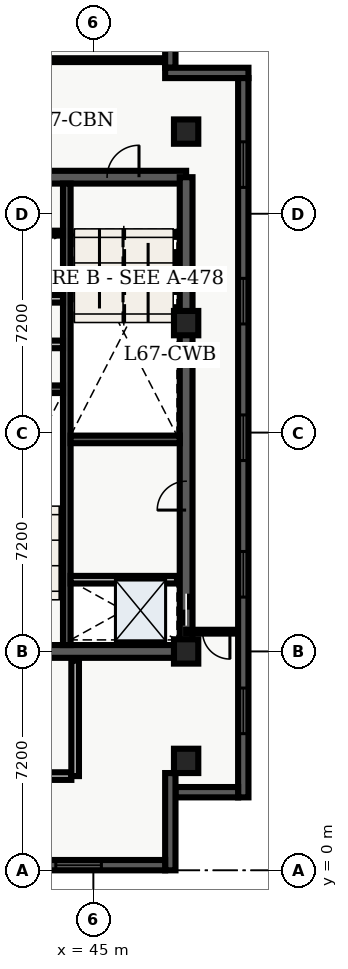
"""IFC4 building model, lengths in metres.
Left out: names, types, materials, properties, quantities, classifications, styles, units other than length and angle.
Written with IfcOpenShell. Run it as: python <this file> out.ifc"""

import sys

from ifc_helpers import new_model, entity, si_unit, converted_unit, direction, frame, origin_with_axes, origin_2d_with_axis, place, context, subcontext, project, spatial, polyline, rectangle, outline, extrude, element, fill, save


model = new_model("IFC4")
c1 = context("Model", 3, precision=1e-05, world=origin_with_axes(), true_north=direction((0.0, 1.0)))
c2 = subcontext(c1, "Body", "Model", "MODEL_VIEW")
j1 = project(units=[si_unit("LENGTHUNIT", "METRE"), converted_unit("PLANEANGLEUNIT", "DEGREE", entity("IfcPlaneAngleMeasure", 0.017), si_unit("PLANEANGLEUNIT", "RADIAN"), dimensions=[0, 0, 0, 0, 0, 0, 0])], contexts=[c1])
p1 = place(None, origin_with_axes())
s1 = spatial("IfcSite", under=j1, at=p1, CompositionType="ELEMENT")
p2 = place(p1, origin_with_axes())
s2 = spatial("IfcBuilding", under=s1, at=p2, CompositionType="ELEMENT")
p3 = place(p2, frame((0.0, 0.0, 272.4), z_axis=(0.0, 0.0, 1.0), x_axis=(1.0, 0.0, 0.0)))
s3 = spatial("IfcBuildingStorey", under=s2, at=p3, CompositionType="ELEMENT", Elevation=272.4)
p4 = place(p3, frame((40.2, 7.2, 0.0), z_axis=(0.0, 0.0, 1.0), x_axis=(1.0, 0.0, 0.0)))
e1 = element("IfcWall", 1, at=p4, inside=s3, PredefinedType="SHEAR", context=c2, shape_type="SweptSolid", body=[
    extrude(outline(polyline([(0.0, -0.21), (7.85, -0.21), (7.85, 0.21), (0.0, 0.21), (0.0, -0.21)])), origin_with_axes(), (0.0, 0.0, 1.0), 3.66),
])
p5 = place(p4, frame((2.175, 0.0, 0.0), z_axis=(0.0, 0.0, 1.0), x_axis=(1.0, 0.0, 0.0)))
e2 = element("IfcOpeningElement", 2, at=p5, cuts=e1, PredefinedType="OPENING", context=c2, shape_type="SweptSolid", body=[
    extrude(rectangle(XDim=1.05, YDim=0.44, at=origin_2d_with_axis()), origin_with_axes(), (0.0, 0.0, 1.0), 2.15),
])
p6 = place(p3, frame((40.2, 22.8, 0.0), z_axis=(0.0, 0.0, 1.0), x_axis=(1.0, 0.0, 0.0)))
e3 = element("IfcWall", 3, at=p6, inside=s3, PredefinedType="SHEAR", context=c2, shape_type="SweptSolid", body=[
    extrude(outline(polyline([(0.0, -0.21), (7.85, -0.21), (7.85, 0.21), (0.0, 0.21), (0.0, -0.21)])), origin_with_axes(), (0.0, 0.0, 1.0), 3.66),
])
p7 = place(p6, frame((5.775, 0.0, 0.0), z_axis=(0.0, 0.0, 1.0), x_axis=(1.0, 0.0, 0.0)))
e4 = element("IfcOpeningElement", 4, at=p7, cuts=e3, PredefinedType="OPENING", context=c2, shape_type="SweptSolid", body=[
    extrude(rectangle(XDim=1.05, YDim=0.44, at=origin_2d_with_axis()), origin_with_axes(), (0.0, 0.0, 1.0), 2.15),
])
p8 = place(p6, frame((2.15, 0.0, 0.0), z_axis=(0.0, 0.0, 1.0), x_axis=(1.0, 0.0, 0.0)))
e5 = element("IfcOpeningElement", 5, at=p8, cuts=e3, PredefinedType="OPENING", context=c2, shape_type="SweptSolid", body=[
    extrude(rectangle(XDim=0.9, YDim=0.44, at=origin_2d_with_axis()), origin_with_axes(), (0.0, 0.0, 1.0), 2.15),
])
p9 = place(p3, frame((48.05, 7.2, 0.0), z_axis=(0.0, 0.0, 1.0), x_axis=(0.0, 1.0, 0.0)))
e6 = element("IfcWall", 6, at=p9, inside=s3, PredefinedType="SHEAR", context=c2, shape_type="SweptSolid", body=[
    extrude(outline(polyline([(0.0, -0.21), (15.6, -0.21), (15.6, 0.21), (0.0, 0.21), (0.0, -0.21)])), origin_with_axes(), (0.0, 0.0, 1.0), 3.66),
])
p10 = place(p9, frame((1.375, 0.0, 0.0), z_axis=(0.0, 0.0, 1.0), x_axis=(1.0, 0.0, 0.0)))
e7 = element("IfcOpeningElement", 7, at=p10, cuts=e6, PredefinedType="OPENING", context=c2, shape_type="SweptSolid", body=[
    extrude(rectangle(XDim=1.05, YDim=0.44, at=origin_2d_with_axis()), origin_with_axes(), (0.0, 0.0, 1.0), 2.15),
])
p11 = place(p9, frame((5.125, 0.0, 0.0), z_axis=(0.0, 0.0, 1.0), x_axis=(1.0, 0.0, 0.0)))
e8 = element("IfcOpeningElement", 8, at=p11, cuts=e6, PredefinedType="OPENING", context=c2, shape_type="SweptSolid", body=[
    extrude(rectangle(XDim=0.95, YDim=0.44, at=origin_2d_with_axis()), origin_with_axes(), (0.0, 0.0, 1.0), 2.15),
])
p12 = place(p3, frame((44.125, 7.41, 0.0), z_axis=(0.0, 0.0, 1.0), x_axis=(0.0, 1.0, 0.0)))
e9 = element("IfcWall", 9, at=p12, inside=s3, PredefinedType="SHEAR", context=c2, shape_type="SweptSolid", body=[
    extrude(outline(polyline([(0.0, -0.125), (15.18, -0.125), (15.18, 0.125), (0.0, 0.125), (0.0, -0.125)])), origin_with_axes(), (0.0, 0.0, 1.0), 3.66),
])
for number, where, z_axis, x_axis in (
    (10, (40.41, 15.825, 0.0), (0.0, 0.0, 1.0), (1.0, 0.0, 0.0)),
    (11, (44.25, 14.175, 0.0), (0.0, 0.0, 1.0), (1.0, 0.0, 0.0)),
):
    element("IfcWall", number, at=place(p3, frame(where, z_axis=z_axis, x_axis=x_axis)), inside=s3, PredefinedType="SHEAR", context=c2, shape_type="SweptSolid", body=[
        extrude(outline(polyline([(0.0, -0.125), (3.59, -0.125), (3.59, 0.125), (0.0, 0.125), (0.0, -0.125)])), origin_with_axes(), (0.0, 0.0, 1.0), 3.66),
    ])
p13 = place(p3, frame((40.5, 17.3, 0.0), z_axis=(0.0, 0.0, 1.0), x_axis=(1.0, 0.0, 0.0)))
e12 = element("IfcWall", 12, at=p13, inside=s3, PredefinedType="SOLIDWALL", context=c2, shape_type="SweptSolid", body=[
    extrude(outline(polyline([(0.0, -0.125), (3.5, -0.125), (3.5, 0.125), (0.0, 0.125), (0.0, -0.125)])), origin_with_axes(), (0.0, 0.0, 1.0), 2.7),
])
p14 = place(p13, frame((2.4, 0.0, 0.0), z_axis=(0.0, 0.0, 1.0), x_axis=(1.0, 0.0, 0.0)))
e13 = element("IfcOpeningElement", 13, at=p14, cuts=e12, PredefinedType="OPENING", context=c2, shape_type="SweptSolid", body=[
    extrude(rectangle(XDim=0.9, YDim=0.27, at=origin_2d_with_axis()), origin_with_axes(), (0.0, 0.0, 1.0), 2.15),
])
p15 = place(p3, frame((40.5, 18.8, 0.0), z_axis=(0.0, 0.0, 1.0), x_axis=(1.0, 0.0, 0.0)))
e14 = element("IfcWall", 14, at=p15, inside=s3, PredefinedType="SOLIDWALL", context=c2, shape_type="SweptSolid", body=[
    extrude(outline(polyline([(0.0, -0.125), (3.5, -0.125), (3.5, 0.125), (0.0, 0.125), (0.0, -0.125)])), origin_with_axes(), (0.0, 0.0, 1.0), 2.7),
])
p16 = place(p3, frame((40.325, 3.1, 0.0), z_axis=(0.0, 0.0, 1.0), x_axis=(1.0, 0.0, 0.0)))
e15 = element("IfcWall", 15, at=p16, inside=s3, PredefinedType="SOLIDWALL", context=c2, shape_type="SweptSolid", body=[
    extrude(outline(polyline([(0.0, -0.125), (3.95, -0.125), (3.95, 0.125), (0.0, 0.125), (0.0, -0.125)])), origin_with_axes(), (0.0, 0.0, 1.0), 2.7),
])
p17 = place(p3, frame((44.4, 3.1, 0.0), z_axis=(0.0, 0.0, 1.0), x_axis=(0.0, 1.0, 0.0)))
e16 = element("IfcWall", 16, at=p17, inside=s3, PredefinedType="SOLIDWALL", context=c2, shape_type="SweptSolid", body=[
    extrude(outline(polyline([(0.0, -0.125), (3.8, -0.125), (3.8, 0.125), (0.0, 0.125), (0.0, -0.125)])), origin_with_axes(), (0.0, 0.0, 1.0), 2.7),
])
for number, where, z_axis, x_axis in (
    (17, (48.05, 3.6, 0.0), (0.0, 0.0, 1.0), (1.0, 0.0, 0.0)),
    (18, (48.05, 7.2, 0.0), (0.0, 0.0, 1.0), (1.0, 0.0, 0.0)),
    (19, (48.05, 18.0, 0.0), (0.0, 0.0, 1.0), (1.0, 0.0, 0.0)),
    (20, (48.05, 24.3, 0.0), (0.0, 0.0, 1.0), (1.0, 0.0, 0.0)),
):
    element("IfcColumn", number, at=place(p3, frame(where, z_axis=z_axis, x_axis=x_axis)), inside=s3, PredefinedType="COLUMN", context=c2, shape_type="SweptSolid", body=[
        extrude(rectangle(XDim=0.8, YDim=0.8, at=origin_2d_with_axis()), origin_with_axes(), (0.0, 0.0, 1.0), 3.9),
    ])
p18 = place(p3, frame((40.5, 20.96, 0.0), z_axis=(0.0, 0.0, 1.0), x_axis=(1.0, 0.0, 0.0)))
e21 = element("IfcWall", 21, at=p18, inside=s3, PredefinedType="PARTITIONING", context=c2, shape_type="SweptSolid", body=[
    extrude(outline(polyline([(0.0, -0.08), (3.5, -0.08), (3.5, 0.08), (0.0, 0.08), (0.0, -0.08)])), origin_with_axes(), (0.0, 0.0, 1.0), 2.7),
])
p19 = place(p3, frame((44.25, 9.56, 0.0), z_axis=(0.0, 0.0, 1.0), x_axis=(1.0, 0.0, 0.0)))
e22 = element("IfcWall", 22, at=p19, inside=s3, PredefinedType="SOLIDWALL", context=c2, shape_type="SweptSolid", body=[
    extrude(outline(polyline([(0.0, -0.125), (3.5, -0.125), (3.5, 0.125), (0.0, 0.125), (0.0, -0.125)])), origin_with_axes(), (0.0, 0.0, 1.0), 2.7),
])
p20 = place(p3, frame((49.765, 7.85, 0.0), z_axis=(0.0, 0.0, 1.0), x_axis=(-1.0, 0.0, 0.0)))
e23 = element("IfcWall", 23, at=p20, inside=s3, PredefinedType="PARTITIONING", context=c2, shape_type="SweptSolid", body=[
    extrude(outline(polyline([(0.0, -0.062), (1.715, -0.062), (1.715, 0.062), (0.0, 0.062), (0.0, -0.062)])), origin_with_axes(), (0.0, 0.0, 1.0), 2.7),
])
p21 = place(p20, frame((0.725, 0.0, 0.0), z_axis=(0.0, 0.0, 1.0), x_axis=(1.0, 0.0, 0.0)))
e24 = element("IfcOpeningElement", 24, at=p21, cuts=e23, PredefinedType="OPENING", context=c2, shape_type="SweptSolid", body=[
    extrude(rectangle(XDim=0.9, YDim=0.145, at=origin_2d_with_axis()), origin_with_axes(), (0.0, 0.0, 1.0), 2.15),
])
p22 = place(p3, frame((34.535, 26.65, 0.0), z_axis=(0.0, 0.0, 1.0), x_axis=(1.0, 0.0, 0.0)))
e25 = element("IfcWall", 25, at=p22, inside=s3, PredefinedType="PARTITIONING", context=c2, shape_type="SweptSolid", body=[
    extrude(outline(polyline([(0.0, -0.062), (12.995, -0.062), (12.995, 0.062), (0.0, 0.062), (0.0, -0.062)])), origin_with_axes(), (0.0, 0.0, 1.0), 2.7),
])
p23 = place(p22, frame((8.465, 0.0, 0.0), z_axis=(0.0, 0.0, 1.0), x_axis=(1.0, 0.0, 0.0)))
e26 = element("IfcOpeningElement", 26, at=p23, cuts=e25, PredefinedType="OPENING", context=c2, shape_type="SweptSolid", body=[
    extrude(rectangle(XDim=1.0, YDim=0.145, at=origin_2d_with_axis()), origin_with_axes(), (0.0, 0.0, 1.0), 2.15),
])
p24 = place(p3, frame((47.53, 28.46, 0.0), z_axis=(0.0, 0.0, 1.0), x_axis=(0.0, -1.0, 0.0)))
e27 = element("IfcWall", 27, at=p24, inside=s3, PredefinedType="SOLIDWALL", context=c2, shape_type="SweptSolid", body=[
    extrude(outline(polyline([(0.0, -0.17), (2.06, -0.17), (2.06, 0.17), (0.0, 0.17), (0.0, -0.17)])), origin_with_axes(), (0.0, 0.0, 1.0), 3.66),
])
p25 = place(p3, frame((47.36, 26.23, 0.0), z_axis=(0.0, 0.0, 1.0), x_axis=(1.0, 0.0, 0.0)))
e28 = element("IfcWall", 28, at=p25, inside=s3, PredefinedType="SOLIDWALL", context=c2, shape_type="SweptSolid", body=[
    extrude(outline(polyline([(0.0, -0.17), (2.74, -0.17), (2.74, 0.17), (0.0, 0.17), (0.0, -0.17)])), origin_with_axes(), (0.0, 0.0, 1.0), 3.66),
])
p26 = place(p3, frame((49.93, 26.06, 0.0), z_axis=(0.0, 0.0, 1.0), x_axis=(0.0, -1.0, 0.0)))
e29 = element("IfcWall", 29, at=p26, inside=s3, PredefinedType="SOLIDWALL", context=c2, shape_type="SweptSolid", body=[
    extrude(outline(polyline([(0.0, -0.17), (23.66, -0.17), (23.66, 0.17), (0.0, 0.17), (0.0, -0.17)])), origin_with_axes(), (0.0, 0.0, 1.0), 3.66),
])
p27 = place(p26, frame((2.846, 0.0, 0.45), z_axis=(0.0, 0.0, 1.0), x_axis=(1.0, 0.0, 0.0)))
e30 = element("IfcOpeningElement", 30, at=p27, cuts=e29, PredefinedType="OPENING", context=c2, shape_type="SweptSolid", body=[
    extrude(rectangle(XDim=1.5, YDim=0.36, at=origin_2d_with_axis()), origin_with_axes(), (0.0, 0.0, 1.0), 2.1),
])
p28 = place(p26, frame((7.338, 0.0, 0.45), z_axis=(0.0, 0.0, 1.0), x_axis=(1.0, 0.0, 0.0)))
e31 = element("IfcOpeningElement", 31, at=p28, cuts=e29, PredefinedType="OPENING", context=c2, shape_type="SweptSolid", body=[
    extrude(rectangle(XDim=1.5, YDim=0.36, at=origin_2d_with_axis()), origin_with_axes(), (0.0, 0.0, 1.0), 2.1),
])
p29 = place(p26, frame((11.83, 0.0, 0.45), z_axis=(0.0, 0.0, 1.0), x_axis=(1.0, 0.0, 0.0)))
e32 = element("IfcOpeningElement", 32, at=p29, cuts=e29, PredefinedType="OPENING", context=c2, shape_type="SweptSolid", body=[
    extrude(rectangle(XDim=1.5, YDim=0.36, at=origin_2d_with_axis()), origin_with_axes(), (0.0, 0.0, 1.0), 2.1),
])
p30 = place(p26, frame((16.322, 0.0, 0.45), z_axis=(0.0, 0.0, 1.0), x_axis=(1.0, 0.0, 0.0)))
e33 = element("IfcOpeningElement", 33, at=p30, cuts=e29, PredefinedType="OPENING", context=c2, shape_type="SweptSolid", body=[
    extrude(rectangle(XDim=1.5, YDim=0.36, at=origin_2d_with_axis()), origin_with_axes(), (0.0, 0.0, 1.0), 2.1),
])
p31 = place(p26, frame((20.814, 0.0, 0.45), z_axis=(0.0, 0.0, 1.0), x_axis=(1.0, 0.0, 0.0)))
e34 = element("IfcOpeningElement", 34, at=p31, cuts=e29, PredefinedType="OPENING", context=c2, shape_type="SweptSolid", body=[
    extrude(rectangle(XDim=1.5, YDim=0.36, at=origin_2d_with_axis()), origin_with_axes(), (0.0, 0.0, 1.0), 2.1),
])
p32 = place(p3, frame((49.76, 2.57, 0.0), z_axis=(0.0, 0.0, 1.0), x_axis=(-1.0, 0.0, 0.0)))
e35 = element("IfcWall", 35, at=p32, inside=s3, PredefinedType="SOLIDWALL", context=c2, shape_type="SweptSolid", body=[
    extrude(outline(polyline([(0.0, -0.17), (2.06, -0.17), (2.06, 0.17), (0.0, 0.17), (0.0, -0.17)])), origin_with_axes(), (0.0, 0.0, 1.0), 3.66),
])
p33 = place(p3, frame((47.53, 3.2, 0.0), z_axis=(0.0, 0.0, 1.0), x_axis=(0.0, -1.0, 0.0)))
e36 = element("IfcWall", 36, at=p33, inside=s3, PredefinedType="SOLIDWALL", context=c2, shape_type="SweptSolid", body=[
    extrude(outline(polyline([(0.0, -0.17), (3.2, -0.17), (3.2, 0.17), (0.0, 0.17), (0.0, -0.17)])), origin_with_axes(), (0.0, 0.0, 1.0), 3.66),
])
p34 = place(p3, frame((47.36, 0.17, 0.0), z_axis=(0.0, 0.0, 1.0), x_axis=(-1.0, 0.0, 0.0)))
e37 = element("IfcWall", 37, at=p34, inside=s3, PredefinedType="SOLIDWALL", context=c2, shape_type="SweptSolid", body=[
    extrude(outline(polyline([(0.0, -0.17), (37.16, -0.17), (37.16, 0.17), (0.0, 0.17), (0.0, -0.17)])), origin_with_axes(), (0.0, 0.0, 1.0), 3.66),
])
p35 = place(p34, frame((2.847, 0.0, 0.45), z_axis=(0.0, 0.0, 1.0), x_axis=(1.0, 0.0, 0.0)))
e38 = element("IfcOpeningElement", 38, at=p35, cuts=e37, PredefinedType="OPENING", context=c2, shape_type="SweptSolid", body=[
    extrude(rectangle(XDim=1.5, YDim=0.36, at=origin_2d_with_axis()), origin_with_axes(), (0.0, 0.0, 1.0), 2.1),
])
p36 = place(p34, frame((7.342, 0.0, 0.45), z_axis=(0.0, 0.0, 1.0), x_axis=(1.0, 0.0, 0.0)))
e39 = element("IfcOpeningElement", 39, at=p36, cuts=e37, PredefinedType="OPENING", context=c2, shape_type="SweptSolid", body=[
    extrude(rectangle(XDim=1.5, YDim=0.36, at=origin_2d_with_axis()), origin_with_axes(), (0.0, 0.0, 1.0), 2.1),
])
p37 = place(p34, frame((11.837, 0.0, 0.45), z_axis=(0.0, 0.0, 1.0), x_axis=(1.0, 0.0, 0.0)))
e40 = element("IfcOpeningElement", 40, at=p37, cuts=e37, PredefinedType="OPENING", context=c2, shape_type="SweptSolid", body=[
    extrude(rectangle(XDim=1.5, YDim=0.36, at=origin_2d_with_axis()), origin_with_axes(), (0.0, 0.0, 1.0), 2.1),
])
p38 = place(p34, frame((16.332, 0.0, 0.45), z_axis=(0.0, 0.0, 1.0), x_axis=(1.0, 0.0, 0.0)))
e41 = element("IfcOpeningElement", 41, at=p38, cuts=e37, PredefinedType="OPENING", context=c2, shape_type="SweptSolid", body=[
    extrude(rectangle(XDim=1.5, YDim=0.36, at=origin_2d_with_axis()), origin_with_axes(), (0.0, 0.0, 1.0), 2.1),
])
p39 = place(p34, frame((20.827, 0.0, 0.45), z_axis=(0.0, 0.0, 1.0), x_axis=(1.0, 0.0, 0.0)))
e42 = element("IfcOpeningElement", 42, at=p39, cuts=e37, PredefinedType="OPENING", context=c2, shape_type="SweptSolid", body=[
    extrude(rectangle(XDim=1.5, YDim=0.36, at=origin_2d_with_axis()), origin_with_axes(), (0.0, 0.0, 1.0), 2.1),
])
p40 = place(p34, frame((25.322, 0.0, 0.45), z_axis=(0.0, 0.0, 1.0), x_axis=(1.0, 0.0, 0.0)))
e43 = element("IfcOpeningElement", 43, at=p40, cuts=e37, PredefinedType="OPENING", context=c2, shape_type="SweptSolid", body=[
    extrude(rectangle(XDim=1.5, YDim=0.36, at=origin_2d_with_axis()), origin_with_axes(), (0.0, 0.0, 1.0), 2.1),
])
p41 = place(p34, frame((29.817, 0.0, 0.45), z_axis=(0.0, 0.0, 1.0), x_axis=(1.0, 0.0, 0.0)))
e44 = element("IfcOpeningElement", 44, at=p41, cuts=e37, PredefinedType="OPENING", context=c2, shape_type="SweptSolid", body=[
    extrude(rectangle(XDim=1.5, YDim=0.36, at=origin_2d_with_axis()), origin_with_axes(), (0.0, 0.0, 1.0), 2.1),
])
p42 = place(p34, frame((34.312, 0.0, 0.45), z_axis=(0.0, 0.0, 1.0), x_axis=(1.0, 0.0, 0.0)))
e45 = element("IfcOpeningElement", 45, at=p42, cuts=e37, PredefinedType="OPENING", context=c2, shape_type="SweptSolid", body=[
    extrude(rectangle(XDim=1.5, YDim=0.36, at=origin_2d_with_axis()), origin_with_axes(), (0.0, 0.0, 1.0), 2.1),
])
p43 = place(p9, frame((1.375, 0.0, 0.0), z_axis=(0.0, 0.0, 1.0), x_axis=(1.0, 0.0, 0.0)))
e46 = element("IfcDoor", 46, at=p43, inside=s3, OperationType="SLIDING_TO_LEFT", PredefinedType="DOOR", context=c2, shape_type="SweptSolid", body=[
    extrude(rectangle(XDim=1.05, YDim=0.09, at=origin_2d_with_axis()), origin_with_axes(), (0.0, 0.0, 1.0), 2.15),
])
fill(e7, e46)
p44 = place(p6, frame((5.775, 0.0, 0.0), z_axis=(0.0, 0.0, 1.0), x_axis=(1.0, 0.0, 0.0)))
e47 = element("IfcDoor", 47, at=p44, inside=s3, OperationType="SINGLE_SWING_RIGHT", PredefinedType="DOOR", context=c2, shape_type="SweptSolid", body=[
    extrude(rectangle(XDim=1.05, YDim=0.09, at=origin_2d_with_axis()), origin_with_axes(), (0.0, 0.0, 1.0), 2.15),
])
fill(e4, e47)
p45 = place(p9, frame((5.125, 0.0, 0.0), z_axis=(0.0, 0.0, 1.0), x_axis=(1.0, 0.0, 0.0)))
e48 = element("IfcDoor", 48, at=p45, inside=s3, OperationType="SINGLE_SWING_LEFT", PredefinedType="DOOR", context=c2, shape_type="SweptSolid", body=[
    extrude(rectangle(XDim=0.95, YDim=0.09, at=origin_2d_with_axis()), origin_with_axes(), (0.0, 0.0, 1.0), 2.15),
])
fill(e8, e48)
p46 = place(p20, frame((0.725, 0.0, 0.0), z_axis=(0.0, 0.0, 1.0), x_axis=(1.0, 0.0, 0.0)))
e49 = element("IfcDoor", 49, at=p46, inside=s3, OperationType="SINGLE_SWING_LEFT", PredefinedType="DOOR", context=c2, shape_type="SweptSolid", body=[
    extrude(rectangle(XDim=0.9, YDim=0.075, at=origin_2d_with_axis()), origin_with_axes(), (0.0, 0.0, 1.0), 2.15),
])
fill(e24, e49)
p47 = place(p26, frame((2.846, 0.0, 0.45), z_axis=(0.0, 0.0, 1.0), x_axis=(1.0, 0.0, 0.0)))
e50 = element("IfcWindow", 50, at=p47, inside=s3, PredefinedType="WINDOW", context=c2, shape_type="SweptSolid", body=[
    extrude(rectangle(XDim=1.5, YDim=0.09, at=origin_2d_with_axis()), origin_with_axes(), (0.0, 0.0, 1.0), 2.1),
])
fill(e30, e50)
p48 = place(p26, frame((7.338, 0.0, 0.45), z_axis=(0.0, 0.0, 1.0), x_axis=(1.0, 0.0, 0.0)))
e51 = element("IfcWindow", 51, at=p48, inside=s3, PredefinedType="WINDOW", context=c2, shape_type="SweptSolid", body=[
    extrude(rectangle(XDim=1.5, YDim=0.09, at=origin_2d_with_axis()), origin_with_axes(), (0.0, 0.0, 1.0), 2.1),
])
fill(e31, e51)
p49 = place(p26, frame((11.83, 0.0, 0.45), z_axis=(0.0, 0.0, 1.0), x_axis=(1.0, 0.0, 0.0)))
e52 = element("IfcWindow", 52, at=p49, inside=s3, PredefinedType="WINDOW", context=c2, shape_type="SweptSolid", body=[
    extrude(rectangle(XDim=1.5, YDim=0.09, at=origin_2d_with_axis()), origin_with_axes(), (0.0, 0.0, 1.0), 2.1),
])
fill(e32, e52)
p50 = place(p26, frame((16.322, 0.0, 0.45), z_axis=(0.0, 0.0, 1.0), x_axis=(1.0, 0.0, 0.0)))
e53 = element("IfcWindow", 53, at=p50, inside=s3, PredefinedType="WINDOW", context=c2, shape_type="SweptSolid", body=[
    extrude(rectangle(XDim=1.5, YDim=0.09, at=origin_2d_with_axis()), origin_with_axes(), (0.0, 0.0, 1.0), 2.1),
])
fill(e33, e53)
p51 = place(p26, frame((20.814, 0.0, 0.45), z_axis=(0.0, 0.0, 1.0), x_axis=(1.0, 0.0, 0.0)))
e54 = element("IfcWindow", 54, at=p51, inside=s3, PredefinedType="WINDOW", context=c2, shape_type="SweptSolid", body=[
    extrude(rectangle(XDim=1.5, YDim=0.09, at=origin_2d_with_axis()), origin_with_axes(), (0.0, 0.0, 1.0), 2.1),
])
fill(e34, e54)
p52 = place(p34, frame((2.847, 0.0, 0.45), z_axis=(0.0, 0.0, 1.0), x_axis=(1.0, 0.0, 0.0)))
e55 = element("IfcWindow", 55, at=p52, inside=s3, PredefinedType="WINDOW", context=c2, shape_type="SweptSolid", body=[
    extrude(rectangle(XDim=1.5, YDim=0.09, at=origin_2d_with_axis()), origin_with_axes(), (0.0, 0.0, 1.0), 2.1),
])
fill(e38, e55)
save(model, sys.argv[1])
